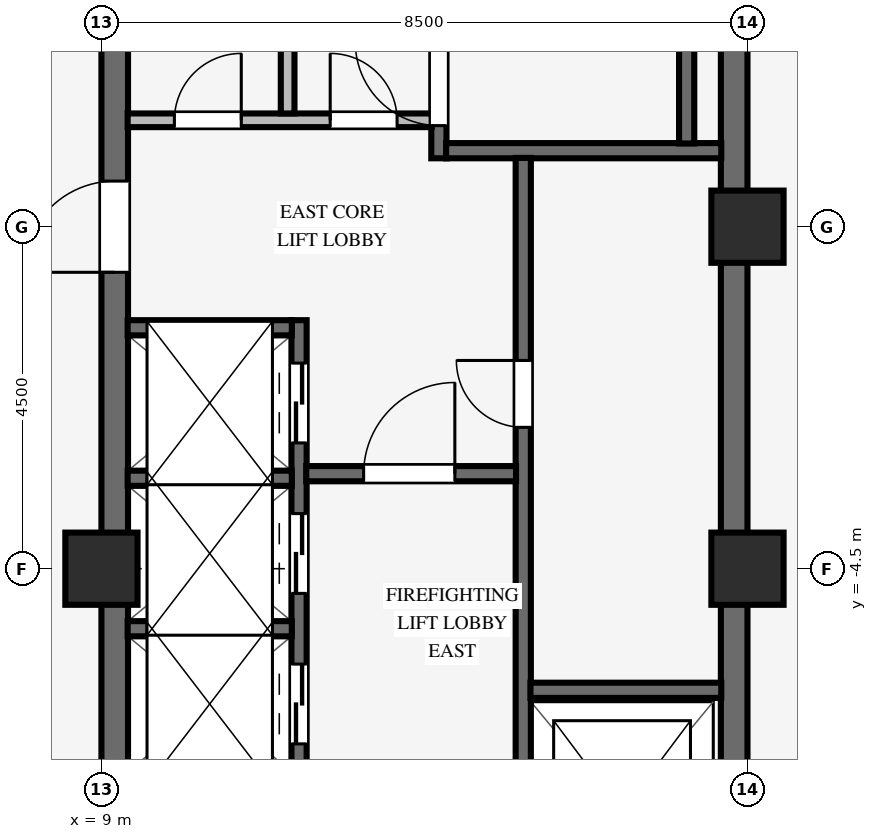
"""IFC4 building model, lengths in metres.
Left out: names, types, materials, properties, quantities, classifications, styles, units other than length and angle.
Written with IfcOpenShell. Run it as: python <this file> out.ifc"""

import sys

from ifc_helpers import new_model, si_unit, direction, frame, frame_2d, origin, origin_2d, place, context, subcontext, project, spatial, rectangle, extrude, source, transform, mapped, element, fill, save


model = new_model("IFC4")
c1 = context("Model", 3, precision=1e-05, world=origin(), true_north=direction((0.0, 1.0)))
c2 = subcontext(c1, "Body", "Model", "MODEL_VIEW")
j1 = project(units=[si_unit("LENGTHUNIT", "METRE"), si_unit("PLANEANGLEUNIT", "RADIAN")], contexts=[c1])
p1 = place(None, origin())
s1 = spatial("IfcSite", under=j1, at=p1, CompositionType="ELEMENT")
p2 = place(p1, origin())
s2 = spatial("IfcBuilding", under=s1, at=p2, CompositionType="ELEMENT")
p3 = place(p2, frame((0.0, 0.0, 212.8)))
s3 = spatial("IfcBuildingStorey", under=s2, at=p3, CompositionType="ELEMENT", Elevation=212.8)
p4 = place(p3, frame((9.175, -9.255, 0.0), z_axis=(0.0, 0.0, 1.0), x_axis=(0.0, 1.0, 0.0)))
e1 = element("IfcWall", 1, at=p4, inside=s3, PredefinedType="SHEAR", context=c2, shape_type="SweptSolid", body=[
    extrude(rectangle(XDim=18.51, YDim=0.35, at=frame_2d((9.255, 0.0))), origin(), (0.0, 0.0, 1.0), 3.37),
])
p5 = place(p4, frame((8.655, 0.0, 0.0)))
e2 = element("IfcOpeningElement", 2, at=p5, cuts=e1, PredefinedType="OPENING", context=c2, shape_type="SweptSolid", body=[
    extrude(rectangle(XDim=1.2, YDim=2.15, at=frame_2d((0.6, 1.075))), frame((0.0, 0.185, 0.0), z_axis=(0.0, -1.0, 0.0), x_axis=(1.0, 0.0, 0.0)), (0.0, 0.0, 1.0), 0.37),
])
p6 = place(p3, frame((17.325, -9.255, 0.0), z_axis=(0.0, 0.0, 1.0), x_axis=(0.0, 1.0, 0.0)))
e3 = element("IfcWall", 3, at=p6, inside=s3, PredefinedType="SHEAR", context=c2, shape_type="SweptSolid", body=[
    extrude(rectangle(XDim=18.51, YDim=0.35, at=frame_2d((9.255, 0.0))), origin(), (0.0, 0.0, 1.0), 3.37),
])
for number, where, z_axis, x_axis in (
    (4, (9.0, -4.5, 0.0), (0.0, 0.0, 1.0), (1.0, 0.0, 0.0)),
    (5, (17.5, -4.5, 0.0), (0.0, 0.0, 1.0), (1.0, 0.0, 0.0)),
    (6, (17.5, 0.0, 0.0), (0.0, 0.0, 1.0), (1.0, 0.0, 0.0)),
):
    element("IfcColumn", number, at=place(p3, frame(where, z_axis=z_axis, x_axis=x_axis)), inside=s3, PredefinedType="COLUMN", context=c2, shape_type="SweptSolid", body=[
        extrude(rectangle(XDim=0.95, YDim=0.95, at=origin_2d()), origin(), (0.0, 0.0, 1.0), 3.37),
    ])
p7 = place(p3, frame((13.44, 0.9, 0.0), z_axis=(0.0, 0.0, 1.0), x_axis=(0.0, 1.0, 0.0)))
e7 = element("IfcWall", 7, at=p7, inside=s3, PredefinedType="SHEAR", context=c2, shape_type="SweptSolid", body=[
    extrude(rectangle(XDim=8.355, YDim=0.2, at=frame_2d((4.177, 0.0))), origin(), (0.0, 0.0, 1.0), 3.37),
])
p8 = place(p7, frame((0.43, 0.0, 0.0)))
e8 = element("IfcOpeningElement", 8, at=p8, cuts=e7, PredefinedType="OPENING", context=c2, shape_type="SweptSolid", body=[
    extrude(rectangle(XDim=1.1, YDim=2.15, at=frame_2d((0.55, 1.075))), frame((0.0, 0.11, 0.0), z_axis=(0.0, -1.0, 0.0), x_axis=(1.0, 0.0, 0.0)), (0.0, 0.0, 1.0), 0.22),
])
p9 = place(p3, frame((13.535, 1.0, 0.0), z_axis=(0.0, 0.0, 1.0), x_axis=(1.0, 0.0, 0.0)))
e9 = element("IfcWall", 9, at=p9, inside=s3, PredefinedType="SHEAR", context=c2, shape_type="SweptSolid", body=[
    extrude(rectangle(XDim=3.62, YDim=0.2, at=frame_2d((1.81, 0.0))), origin(), (0.0, 0.0, 1.0), 3.37),
])
p10 = place(p3, frame((16.7, 1.095, 0.0), z_axis=(0.0, 0.0, 1.0), x_axis=(0.0, 1.0, 0.0)))
e10 = element("IfcWall", 10, at=p10, inside=s3, PredefinedType="SHEAR", context=c2, shape_type="SweptSolid", body=[
    extrude(rectangle(XDim=8.16, YDim=0.2, at=frame_2d((4.08, 0.0))), origin(), (0.0, 0.0, 1.0), 3.37),
])
p11 = place(p3, frame((14.55, -9.255, 0.0), z_axis=(0.0, 0.0, 1.0), x_axis=(0.0, 1.0, 0.0)))
e11 = element("IfcWall", 11, at=p11, inside=s3, PredefinedType="SHEAR", context=c2, shape_type="SweptSolid", body=[
    extrude(rectangle(XDim=10.16, YDim=0.2, at=frame_2d((5.08, 0.0))), origin(), (0.0, 0.0, 1.0), 3.37),
])
p12 = place(p11, frame((6.615, 0.0, 0.0)))
e12 = element("IfcOpeningElement", 12, at=p12, cuts=e11, PredefinedType="OPENING", context=c2, shape_type="SweptSolid", body=[
    extrude(rectangle(XDim=0.88, YDim=2.1, at=frame_2d((0.44, 1.05))), frame((0.0, 0.11, 0.0), z_axis=(0.0, -1.0, 0.0), x_axis=(1.0, 0.0, 0.0)), (0.0, 0.0, 1.0), 0.22),
])
p13 = place(p11, frame((0.98, 0.0, 0.0)))
e13 = element("IfcOpeningElement", 13, at=p13, cuts=e11, PredefinedType="OPENING", context=c2, shape_type="SweptSolid", body=[
    extrude(rectangle(XDim=1.15, YDim=2.15, at=frame_2d((0.575, 1.075))), frame((0.0, 0.11, 0.0), z_axis=(0.0, -1.0, 0.0), x_axis=(1.0, 0.0, 0.0)), (0.0, 0.0, 1.0), 0.22),
])
p14 = place(p3, frame((14.645, -6.1, 0.0), z_axis=(0.0, 0.0, 1.0), x_axis=(1.0, 0.0, 0.0)))
e14 = element("IfcWall", 14, at=p14, inside=s3, PredefinedType="SHEAR", context=c2, shape_type="SweptSolid", body=[
    extrude(rectangle(XDim=2.51, YDim=0.2, at=frame_2d((1.255, 0.0))), origin(), (0.0, 0.0, 1.0), 3.37),
])
p15 = place(p3, frame((11.6, -9.255, 0.0), z_axis=(0.0, 0.0, 1.0), x_axis=(0.0, 1.0, 0.0)))
e15 = element("IfcWall", 15, at=p15, inside=s3, PredefinedType="SHEAR", context=c2, shape_type="SweptSolid", body=[
    extrude(rectangle(XDim=8.025, YDim=0.2, at=frame_2d((4.012, 0.0))), origin(), (0.0, 0.0, 1.0), 3.37),
])
p16 = place(p15, frame((0.47, 0.0, 0.0)))
e16 = element("IfcOpeningElement", 16, at=p16, cuts=e15, PredefinedType="OPENING", context=c2, shape_type="SweptSolid", body=[
    extrude(rectangle(XDim=1.05, YDim=2.15, at=frame_2d((0.525, 1.075))), frame((0.0, 0.11, 0.0), z_axis=(0.0, -1.0, 0.0), x_axis=(1.0, 0.0, 0.0)), (0.0, 0.0, 1.0), 0.22),
])
p17 = place(p15, frame((2.45, 0.0, 0.0)))
e17 = element("IfcOpeningElement", 17, at=p17, cuts=e15, PredefinedType="OPENING", context=c2, shape_type="SweptSolid", body=[
    extrude(rectangle(XDim=1.05, YDim=2.15, at=frame_2d((0.525, 1.075))), frame((0.0, 0.11, 0.0), z_axis=(0.0, -1.0, 0.0), x_axis=(1.0, 0.0, 0.0)), (0.0, 0.0, 1.0), 0.22),
])
p18 = place(p15, frame((4.43, 0.0, 0.0)))
e18 = element("IfcOpeningElement", 18, at=p18, cuts=e15, PredefinedType="OPENING", context=c2, shape_type="SweptSolid", body=[
    extrude(rectangle(XDim=1.05, YDim=2.15, at=frame_2d((0.525, 1.075))), frame((0.0, 0.11, 0.0), z_axis=(0.0, -1.0, 0.0), x_axis=(1.0, 0.0, 0.0)), (0.0, 0.0, 1.0), 0.22),
])
p19 = place(p15, frame((6.41, 0.0, 0.0)))
e19 = element("IfcOpeningElement", 19, at=p19, cuts=e15, PredefinedType="OPENING", context=c2, shape_type="SweptSolid", body=[
    extrude(rectangle(XDim=1.05, YDim=2.15, at=frame_2d((0.525, 1.075))), frame((0.0, 0.11, 0.0), z_axis=(0.0, -1.0, 0.0), x_axis=(1.0, 0.0, 0.0)), (0.0, 0.0, 1.0), 0.22),
])
p20 = place(p3, frame((11.695, -3.25, 0.0), z_axis=(0.0, 0.0, 1.0), x_axis=(1.0, 0.0, 0.0)))
e20 = element("IfcWall", 20, at=p20, inside=s3, PredefinedType="SHEAR", context=c2, shape_type="SweptSolid", body=[
    extrude(rectangle(XDim=2.76, YDim=0.2, at=frame_2d((1.38, 0.0))), origin(), (0.0, 0.0, 1.0), 3.37),
])
p21 = place(p20, frame((0.755, 0.0, 0.0)))
e21 = element("IfcOpeningElement", 21, at=p21, cuts=e20, PredefinedType="OPENING", context=c2, shape_type="SweptSolid", body=[
    extrude(rectangle(XDim=1.2, YDim=2.15, at=frame_2d((0.6, 1.075))), frame((0.0, 0.11, 0.0), z_axis=(0.0, -1.0, 0.0), x_axis=(1.0, 0.0, 0.0)), (0.0, 0.0, 1.0), 0.22),
])
for number, where, z_axis, x_axis in (
    (22, (9.345, -5.29, 0.0), (0.0, 0.0, 1.0), (1.0, 0.0, 0.0)),
    (23, (9.345, -3.31, 0.0), (0.0, 0.0, 1.0), (1.0, 0.0, 0.0)),
    (24, (9.345, -1.33, 0.0), (0.0, 0.0, 1.0), (1.0, 0.0, 0.0)),
):
    element("IfcWall", number, at=place(p3, frame(where, z_axis=z_axis, x_axis=x_axis)), inside=s3, PredefinedType="SHEAR", context=c2, shape_type="SweptSolid", body=[
        extrude(rectangle(XDim=2.16, YDim=0.2, at=frame_2d((1.08, 0.0))), origin(), (0.0, 0.0, 1.0), 3.37),
    ])
p22 = place(p3, frame((9.345, 1.4, 0.0), z_axis=(0.0, 0.0, 1.0), x_axis=(1.0, 0.0, 0.0)))
e25 = element("IfcWall", 25, at=p22, inside=s3, PredefinedType="PARTITIONING", context=c2, shape_type="SweptSolid", body=[
    extrude(rectangle(XDim=4.0, YDim=0.18, at=frame_2d((2.0, 0.0))), origin(), (0.0, 0.0, 1.0), 3.36),
])
p23 = place(p22, frame((0.615, 0.0, 0.0)))
e26 = element("IfcOpeningElement", 26, at=p23, cuts=e25, PredefinedType="OPENING", context=c2, shape_type="SweptSolid", body=[
    extrude(rectangle(XDim=0.88, YDim=2.1, at=frame_2d((0.44, 1.05))), frame((0.0, 0.1, 0.0), z_axis=(0.0, -1.0, 0.0), x_axis=(1.0, 0.0, 0.0)), (0.0, 0.0, 1.0), 0.2),
])
p24 = place(p22, frame((2.665, 0.0, 0.0)))
e27 = element("IfcOpeningElement", 27, at=p24, cuts=e25, PredefinedType="OPENING", context=c2, shape_type="SweptSolid", body=[
    extrude(rectangle(XDim=0.88, YDim=2.1, at=frame_2d((0.44, 1.05))), frame((0.0, 0.1, 0.0), z_axis=(0.0, -1.0, 0.0), x_axis=(1.0, 0.0, 0.0)), (0.0, 0.0, 1.0), 0.2),
])
p25 = place(p3, frame((11.45, 1.49, 0.0), z_axis=(0.0, 0.0, 1.0), x_axis=(0.0, 1.0, 0.0)))
e28 = element("IfcWall", 28, at=p25, inside=s3, PredefinedType="PARTITIONING", context=c2, shape_type="SweptSolid", body=[
    extrude(rectangle(XDim=7.765, YDim=0.18, at=frame_2d((3.882, 0.0))), origin(), (0.0, 0.0, 1.0), 3.36),
])
m1 = source(origin(), c2, "Body", "SweptSolid", [
    extrude(rectangle(XDim=1.1, YDim=2.15, at=frame_2d((0.55, 1.075))), frame((0.0, 0.025, 0.0), z_axis=(0.0, -1.0, 0.0), x_axis=(1.0, 0.0, 0.0)), (0.0, 0.0, 1.0), 0.05),
])
p26 = place(p8, origin())
e29 = element("IfcDoor", 29, at=p26, inside=s3, OperationType="SINGLE_SWING_RIGHT", PredefinedType="DOOR", context=c2, shape_type="MappedRepresentation", body=[
    mapped(m1, transform((0.0, 0.0, 0.0), scale=1.0)),
])
fill(e8, e29)
m2 = source(origin(), c2, "Body", "SweptSolid", [
    extrude(rectangle(XDim=0.88, YDim=2.1, at=frame_2d((0.44, 1.05))), frame((0.0, 0.025, 0.0), z_axis=(0.0, -1.0, 0.0), x_axis=(1.0, 0.0, 0.0)), (0.0, 0.0, 1.0), 0.05),
])
p27 = place(p12, origin())
e30 = element("IfcDoor", 30, at=p27, inside=s3, OperationType="SINGLE_SWING_RIGHT", PredefinedType="DOOR", context=c2, shape_type="MappedRepresentation", body=[
    mapped(m2, transform((0.0, 0.0, 0.0), scale=1.0)),
])
fill(e12, e30)
m3 = source(origin(), c2, "Body", "SweptSolid", [
    extrude(rectangle(XDim=1.2, YDim=2.15, at=frame_2d((0.6, 1.075))), frame((0.0, 0.025, 0.0), z_axis=(0.0, -1.0, 0.0), x_axis=(1.0, 0.0, 0.0)), (0.0, 0.0, 1.0), 0.05),
])
p28 = place(p21, origin())
e31 = element("IfcDoor", 31, at=p28, inside=s3, OperationType="SINGLE_SWING_RIGHT", PredefinedType="DOOR", context=c2, shape_type="MappedRepresentation", body=[
    mapped(m3, transform((0.0, 0.0, 0.0), scale=1.0)),
])
fill(e21, e31)
p29 = place(p5, origin())
e32 = element("IfcDoor", 32, at=p29, inside=s3, OperationType="SINGLE_SWING_LEFT", PredefinedType="DOOR", context=c2, shape_type="MappedRepresentation", body=[
    mapped(m3, transform((0.0, 0.0, 0.0), scale=1.0)),
])
fill(e2, e32)
p30 = place(p23, origin())
e33 = element("IfcDoor", 33, at=p30, inside=s3, OperationType="SINGLE_SWING_RIGHT", PredefinedType="DOOR", context=c2, shape_type="MappedRepresentation", body=[
    mapped(m2, transform((0.0, 0.0, 0.0), scale=1.0)),
])
fill(e26, e33)
p31 = place(p24, origin())
e34 = element("IfcDoor", 34, at=p31, inside=s3, OperationType="SINGLE_SWING_LEFT", PredefinedType="DOOR", context=c2, shape_type="MappedRepresentation", body=[
    mapped(m2, transform((0.0, 0.0, 0.0), scale=1.0)),
])
fill(e27, e34)
m4 = source(origin(), c2, "Body", "SweptSolid", [
    extrude(rectangle(XDim=1.05, YDim=2.15, at=frame_2d((0.525, 1.075))), frame((0.0, 0.025, 0.0), z_axis=(0.0, -1.0, 0.0), x_axis=(1.0, 0.0, 0.0)), (0.0, 0.0, 1.0), 0.05),
])
p32 = place(p17, origin())
e35 = element("IfcDoor", 35, at=p32, inside=s3, OperationType="DOUBLE_DOOR_SLIDING", PredefinedType="DOOR", context=c2, shape_type="MappedRepresentation", body=[
    mapped(m4, transform((0.0, 0.0, 0.0), scale=1.0)),
])
fill(e17, e35)
p33 = place(p18, origin())
e36 = element("IfcDoor", 36, at=p33, inside=s3, OperationType="DOUBLE_DOOR_SLIDING", PredefinedType="DOOR", context=c2, shape_type="MappedRepresentation", body=[
    mapped(m4, transform((0.0, 0.0, 0.0), scale=1.0)),
])
fill(e18, e36)
p34 = place(p19, origin())
e37 = element("IfcDoor", 37, at=p34, inside=s3, OperationType="DOUBLE_DOOR_SLIDING", PredefinedType="DOOR", context=c2, shape_type="MappedRepresentation", body=[
    mapped(m4, transform((0.0, 0.0, 0.0), scale=1.0)),
])
fill(e19, e37)
save(model, sys.argv[1])
